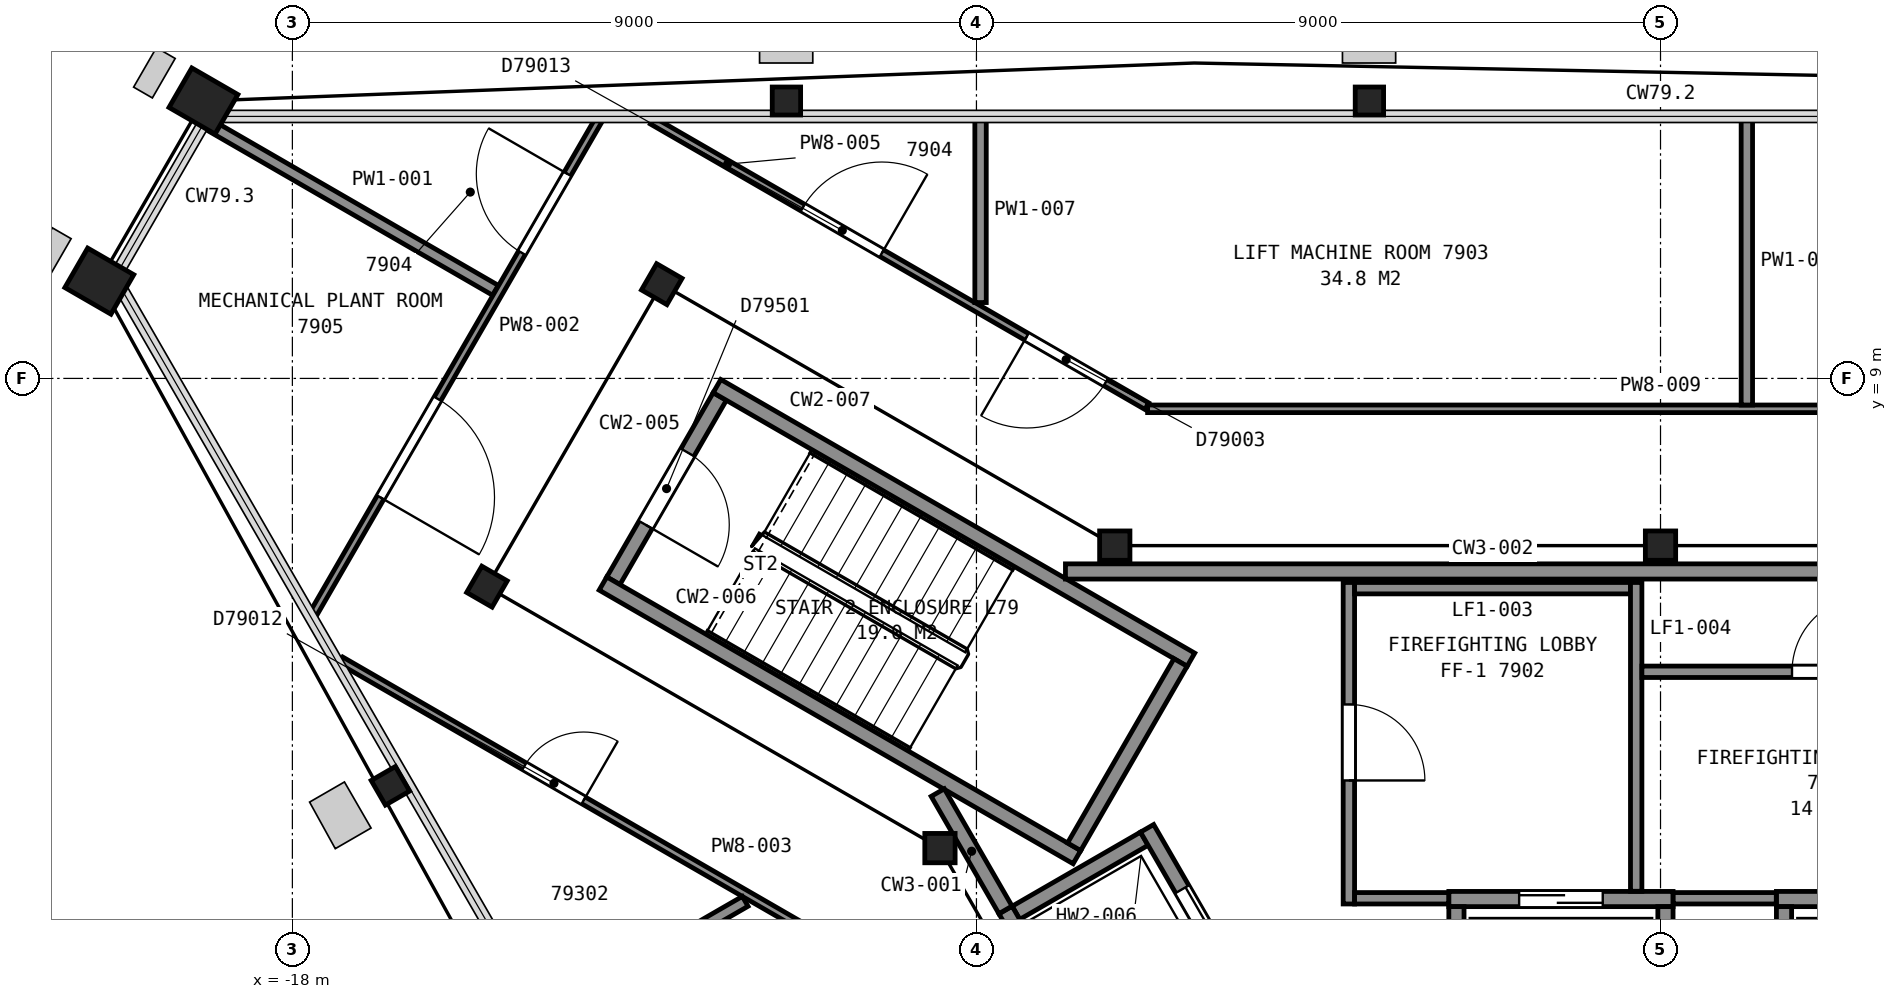
"""IFC4 building model, lengths in metres.
Left out: names, types, materials, properties, quantities, classifications, styles, units other than length and angle.
Written with IfcOpenShell. Run it as: python <this file> out.ifc"""

import sys

from ifc_helpers import new_model, si_unit, direction, frame, frame_2d, origin, origin_2d, place, context, subcontext, project, spatial, rectangle, hollow_rectangle, i_section, extrude, element, fill, save


model = new_model("IFC4")
c1 = context("Model", 3, precision=1e-05, world=origin(), true_north=direction((0.0, 1.0)))
c2 = subcontext(c1, "Body", "Model", "MODEL_VIEW")
j1 = project(units=[si_unit("LENGTHUNIT", "METRE"), si_unit("PLANEANGLEUNIT", "RADIAN")], contexts=[c1])
p1 = place(None, origin())
s1 = spatial("IfcSite", under=j1, at=p1, CompositionType="ELEMENT")
p2 = place(p1, origin())
s2 = spatial("IfcBuilding", under=s1, at=p2, CompositionType="ELEMENT")
p3 = place(p2, frame((0.0, 0.0, 312.6)))
s3 = spatial("IfcBuildingStorey", under=s2, at=p3, CompositionType="ELEMENT", Elevation=312.6)
for number, where, z_axis, x_axis in (
    (1, (-3.83, 12.65, 0.0), (0.0, 0.0, 1.0), (1.0, 0.0, 0.0)),
    (2, (-11.5, 12.65, 0.0), (0.0, 0.0, 1.0), (1.0, 0.0, 0.0)),
):
    element("IfcColumn", number, at=place(p3, frame(where, z_axis=z_axis, x_axis=x_axis)), inside=s3, PredefinedType="COLUMN", context=c2, shape_type="SweptSolid", body=[
        extrude(i_section(OverallWidth=0.373, OverallDepth=0.368, WebThickness=0.015, FlangeThickness=0.024, FilletRadius=0.015, at=origin_2d()), origin(), (0.0, 0.0, 1.0), 4.2),
    ])
for number, where, z_axis, x_axis in (
    (3, (-19.17, 12.65, 0.0), (0.0, 0.0, 1.0), (0.5, 0.866, 0.0)),
    (4, (-20.54, 10.28, 0.0), (0.0, 0.0, 1.0), (0.5, 0.866, 0.0)),
):
    element("IfcColumn", number, at=place(p3, frame(where, z_axis=z_axis, x_axis=x_axis)), inside=s3, PredefinedType="COLUMN", context=c2, shape_type="SweptSolid", body=[
        extrude(hollow_rectangle(XDim=0.6, YDim=0.7, WallThickness=0.04, at=origin_2d()), origin(), (0.0, 0.0, 1.0), 4.2),
    ])
p4 = place(p3, frame((-16.71, 3.64, 0.0), z_axis=(0.0, 0.0, 1.0), x_axis=(-0.5, 0.866025403784, 0.0)))
e5 = element("IfcColumn", 5, at=p4, inside=s3, PredefinedType="COLUMN", context=c2, shape_type="SweptSolid", body=[
    extrude(i_section(OverallWidth=0.373, OverallDepth=0.368, WebThickness=0.015, FlangeThickness=0.024, FilletRadius=0.015, at=origin_2d()), origin(), (0.0, 0.0, 1.0), 4.2),
])
for number, where, z_axis, x_axis in (
    (6, (0.0, 6.8, 0.0), (0.0, 0.0, 1.0), (1.0, 0.0, 0.0)),
    (7, (-7.18, 6.8, 0.0), (0.0, 0.0, 1.0), (1.0, 0.0, 0.0)),
    (8, (-13.14, 10.24, 0.0), (0.0, 0.0, 1.0), (0.5, 0.866, 0.0)),
    (9, (-15.44, 6.26, 0.0), (0.0, 0.0, 1.0), (0.5, 0.866, 0.0)),
    (10, (-9.48, 2.82, 0.0), (0.0, 0.0, 1.0), (1.0, 0.0, 0.0)),
):
    element("IfcColumn", number, at=place(p3, frame(where, z_axis=z_axis, x_axis=x_axis)), inside=s3, PredefinedType="COLUMN", context=c2, shape_type="SweptSolid", body=[
        extrude(i_section(OverallWidth=0.399, OverallDepth=0.386, WebThickness=0.021, FlangeThickness=0.033, FilletRadius=0.015, at=origin_2d()), origin(), (0.0, 0.0, 1.0), 4.2),
    ])
p5 = place(p3, frame((-12.377, 8.762, 0.0), z_axis=(0.0, 0.0, 1.0), x_axis=(-0.500049511043, -0.865996816683, 0.0)))
e11 = element("IfcWall", 11, at=p5, inside=s3, PredefinedType="PARTITIONING", context=c2, shape_type="SweptSolid", body=[
    extrude(rectangle(XDim=2.8, YDim=0.2, at=frame_2d((1.4, 0.0))), origin(), (0.0, 0.0, 1.0), 3.95),
])
p6 = place(p5, frame((0.85, 0.0, 0.0)))
e12 = element("IfcOpeningElement", 12, at=p6, cuts=e11, PredefinedType="OPENING", context=c2, shape_type="SweptSolid", body=[
    extrude(rectangle(XDim=1.1, YDim=2.1, at=frame_2d((0.55, 1.05))), frame((0.0, 0.11, 0.0), z_axis=(0.0, -1.0, 0.0), x_axis=(1.0, 0.0, 0.0)), (0.0, 0.0, 1.0), 0.22),
])
for number, where, z_axis, x_axis in (
    (13, (-7.678, 2.701, 0.0), (0.0, 0.0, 1.0), (-0.866, 0.5, 0.0)),
    (14, (-6.178, 5.299, 0.0), (0.0, 0.0, 1.0), (-0.866, 0.5, 0.0)),
):
    element("IfcWall", number, at=place(p3, frame(where, z_axis=z_axis, x_axis=x_axis)), inside=s3, PredefinedType="PARTITIONING", context=c2, shape_type="SweptSolid", body=[
        extrude(rectangle(XDim=7.2, YDim=0.2, at=frame_2d((3.6, 0.0))), origin(), (0.0, 0.0, 1.0), 3.95),
    ])
p7 = place(p3, frame((-6.315, 5.262, 0.0), z_axis=(0.0, 0.0, 1.0), x_axis=(-0.500049511043, -0.865996816683, 0.0)))
e15 = element("IfcWall", 15, at=p7, inside=s3, PredefinedType="PARTITIONING", context=c2, shape_type="SweptSolid", body=[
    extrude(rectangle(XDim=2.8, YDim=0.2, at=frame_2d((1.4, 0.0))), origin(), (0.0, 0.0, 1.0), 3.95),
])
p8 = place(p3, frame((-2.785, 2.15, 0.0), z_axis=(0.0, 0.0, 1.0), x_axis=(1.0, 0.0, 0.0)))
e16 = element("IfcWall", 16, at=p8, inside=s3, PredefinedType="PARTITIONING", context=c2, shape_type="SweptSolid", body=[
    extrude(rectangle(XDim=2.95, YDim=0.2, at=frame_2d((1.475, 0.0))), origin(), (0.0, 0.0, 1.0), 4.2),
])
p9 = place(p8, frame((0.925, 0.0, 0.0)))
e17 = element("IfcOpeningElement", 17, at=p9, cuts=e16, PredefinedType="OPENING", context=c2, shape_type="SweptSolid", body=[
    extrude(rectangle(XDim=1.1, YDim=2.1, at=frame_2d((0.55, 1.05))), frame((0.0, 0.11, 0.0), z_axis=(0.0, -1.0, 0.0), x_axis=(1.0, 0.0, 0.0)), (0.0, 0.0, 1.0), 0.22),
])
p10 = place(p3, frame((1.525, 2.15, 0.0), z_axis=(0.0, 0.0, 1.0), x_axis=(1.0, 0.0, 0.0)))
e18 = element("IfcWall", 18, at=p10, inside=s3, PredefinedType="PARTITIONING", context=c2, shape_type="SweptSolid", body=[
    extrude(rectangle(XDim=2.95, YDim=0.2, at=frame_2d((1.475, 0.0))), origin(), (0.0, 0.0, 1.0), 4.2),
])
p11 = place(p10, frame((0.925, 0.0, 0.0)))
e19 = element("IfcOpeningElement", 19, at=p11, cuts=e18, PredefinedType="OPENING", context=c2, shape_type="SweptSolid", body=[
    extrude(rectangle(XDim=1.1, YDim=2.1, at=frame_2d((0.55, 1.05))), frame((0.0, 0.11, 0.0), z_axis=(0.0, -1.0, 0.0), x_axis=(1.0, 0.0, 0.0)), (0.0, 0.0, 1.0), 0.22),
])
for number, where, z_axis, x_axis in (
    (20, (-8.48, 1.969, 0.0), (0.0, 0.0, 1.0), (0.866, 0.5, 0.0)),
    (21, (1.625, 0.1, 0.0), (0.0, 0.0, 1.0), (0.0, 1.0, 0.0)),
    (22, (0.065, 0.1, 0.0), (0.0, 0.0, 1.0), (0.0, 1.0, 0.0)),
    (23, (-2.685, 0.1, 0.0), (0.0, 0.0, 1.0), (0.0, 1.0, 0.0)),
):
    element("IfcWall", number, at=place(p3, frame(where, z_axis=z_axis, x_axis=x_axis)), inside=s3, PredefinedType="PARTITIONING", context=c2, shape_type="SweptSolid", body=[
        extrude(rectangle(XDim=1.95, YDim=0.2, at=frame_2d((0.975, 0.0))), origin(), (0.0, 0.0, 1.0), 4.2),
    ])
p12 = place(p3, frame((-5.28, 0.525, 0.0), z_axis=(0.0, 0.0, 1.0), x_axis=(-0.500037662692, 0.866003658127, 0.0)))
e24 = element("IfcWall", 24, at=p12, inside=s3, PredefinedType="PARTITIONING", context=c2, shape_type="SweptSolid", body=[
    extrude(rectangle(XDim=2.95, YDim=0.2, at=frame_2d((1.475, 0.0))), origin(), (0.0, 0.0, 1.0), 4.2),
])
p13 = place(p12, frame((0.925, 0.0, 0.0)))
e25 = element("IfcOpeningElement", 25, at=p13, cuts=e24, PredefinedType="OPENING", context=c2, shape_type="SweptSolid", body=[
    extrude(rectangle(XDim=1.1, YDim=2.1, at=frame_2d((0.55, 1.05))), frame((0.0, 0.11, 0.0), z_axis=(0.0, -1.0, 0.0), x_axis=(1.0, 0.0, 0.0)), (0.0, 0.0, 1.0), 0.22),
])
p14 = place(p3, frame((-7.142, -0.55, 0.0), z_axis=(0.0, 0.0, 1.0), x_axis=(-0.49997559174, 0.866039495442, 0.0)))
e26 = element("IfcWall", 26, at=p14, inside=s3, PredefinedType="PARTITIONING", context=c2, shape_type="SweptSolid", body=[
    extrude(rectangle(XDim=2.95, YDim=0.2, at=frame_2d((1.475, 0.0))), origin(), (0.0, 0.0, 1.0), 4.2),
])
p15 = place(p3, frame((-9.509, 3.551, 0.0), z_axis=(0.0, 0.0, 1.0), x_axis=(0.499999136801, -0.866025902152, 0.0)))
e27 = element("IfcWall", 27, at=p15, inside=s3, PredefinedType="PARTITIONING", context=c2, shape_type="SweptSolid", body=[
    extrude(rectangle(XDim=1.782, YDim=0.2, at=frame_2d((0.891, 0.0))), origin(), (0.0, 0.0, 1.0), 3.95),
])
p16 = place(p3, frame((7.829, 6.46, 0.0), z_axis=(0.0, 0.0, 1.0), x_axis=(-1.0, 0.0, 0.0)))
e28 = element("IfcWall", 28, at=p16, inside=s3, PredefinedType="PARTITIONING", context=c2, shape_type="SweptSolid", body=[
    extrude(rectangle(XDim=15.658, YDim=0.2, at=frame_2d((7.829, 0.0))), origin(), (0.0, 0.0, 1.0), 3.95),
])
p17 = place(p16, frame((2.618, 0.0, 0.0)))
e29 = element("IfcOpeningElement", 29, at=p17, cuts=e28, PredefinedType="OPENING", context=c2, shape_type="SweptSolid", body=[
    extrude(rectangle(XDim=1.8, YDim=2.1, at=frame_2d((0.9, 1.05))), frame((0.0, 0.11, 0.0), z_axis=(0.0, -1.0, 0.0), x_axis=(1.0, 0.0, 0.0)), (0.0, 0.0, 1.0), 0.22),
])
p18 = place(p3, frame((-4.1, 2.085, 0.0), z_axis=(0.0, 0.0, 1.0), x_axis=(0.0, 1.0, 0.0)))
e30 = element("IfcWall", 30, at=p18, inside=s3, PredefinedType="PARTITIONING", context=c2, shape_type="SweptSolid", body=[
    extrude(rectangle(XDim=4.23, YDim=0.15, at=frame_2d((2.115, 0.0))), origin(), (0.0, 0.0, 1.0), 3.95),
])
p19 = place(p18, frame((1.625, 0.0, 0.0)))
e31 = element("IfcOpeningElement", 31, at=p19, cuts=e30, PredefinedType="OPENING", context=c2, shape_type="SweptSolid", body=[
    extrude(rectangle(XDim=1.0, YDim=2.1, at=frame_2d((0.5, 1.05))), frame((0.0, 0.085, 0.0), z_axis=(0.0, -1.0, 0.0), x_axis=(1.0, 0.0, 0.0)), (0.0, 0.0, 1.0), 0.17),
])
p20 = place(p3, frame((-4.025, 2.16, 0.0), z_axis=(0.0, 0.0, 1.0), x_axis=(1.0, 0.0, 0.0)))
e32 = element("IfcWall", 32, at=p20, inside=s3, PredefinedType="PARTITIONING", context=c2, shape_type="SweptSolid", body=[
    extrude(rectangle(XDim=1.238, YDim=0.15, at=frame_2d((0.619, 0.0))), origin(), (0.0, 0.0, 1.0), 3.95),
])
p21 = place(p3, frame((-4.025, 6.24, 0.0), z_axis=(0.0, 0.0, 1.0), x_axis=(1.0, 0.0, 0.0)))
e33 = element("IfcWall", 33, at=p21, inside=s3, PredefinedType="PARTITIONING", context=c2, shape_type="SweptSolid", body=[
    extrude(rectangle(XDim=3.63, YDim=0.15, at=frame_2d((1.815, 0.0))), origin(), (0.0, 0.0, 1.0), 3.95),
])
p22 = place(p3, frame((-0.32, 2.252, 0.0), z_axis=(0.0, 0.0, 1.0), x_axis=(0.0, 1.0, 0.0)))
e34 = element("IfcWall", 34, at=p22, inside=s3, PredefinedType="PARTITIONING", context=c2, shape_type="SweptSolid", body=[
    extrude(rectangle(XDim=4.063, YDim=0.15, at=frame_2d((2.031, 0.0))), origin(), (0.0, 0.0, 1.0), 3.95),
])
p23 = place(p3, frame((-0.245, 5.14, 0.0), z_axis=(0.0, 0.0, 1.0), x_axis=(1.0, 0.0, 0.0)))
e35 = element("IfcWall", 35, at=p23, inside=s3, PredefinedType="PARTITIONING", context=c2, shape_type="SweptSolid", body=[
    extrude(rectangle(XDim=5.11, YDim=0.15, at=frame_2d((2.555, 0.0))), origin(), (0.0, 0.0, 1.0), 3.95),
])
p24 = place(p23, frame((1.975, 0.0, 0.0)))
e36 = element("IfcOpeningElement", 36, at=p24, cuts=e35, PredefinedType="OPENING", context=c2, shape_type="SweptSolid", body=[
    extrude(rectangle(XDim=1.0, YDim=2.1, at=frame_2d((0.5, 1.05))), frame((0.0, 0.085, 0.0), z_axis=(0.0, -1.0, 0.0), x_axis=(1.0, 0.0, 0.0)), (0.0, 0.0, 1.0), 0.17),
])
p25 = place(p3, frame((0.167, 2.16, 0.0), z_axis=(0.0, 0.0, 1.0), x_axis=(1.0, 0.0, 0.0)))
e37 = element("IfcWall", 37, at=p25, inside=s3, PredefinedType="PARTITIONING", context=c2, shape_type="SweptSolid", body=[
    extrude(rectangle(XDim=1.356, YDim=0.15, at=frame_2d((0.678, 0.0))), origin(), (0.0, 0.0, 1.0), 3.95),
])
p26 = place(p3, frame((-19.145, 12.365, 0.0), z_axis=(0.0, 0.0, 1.0), x_axis=(0.865798950571, -0.500392023508, 0.0)))
e38 = element("IfcWall", 38, at=p26, inside=s3, PredefinedType="PARTITIONING", context=c2, shape_type="SweptSolid", body=[
    extrude(rectangle(XDim=4.408, YDim=0.15, at=frame_2d((2.204, 0.0))), origin(), (0.0, 0.0, 1.0), 3.297),
])
p27 = place(p3, frame((-17.73, 5.894, 0.0), z_axis=(0.0, 0.0, 1.0), x_axis=(0.500350572687, 0.865822905918, 0.0)))
e39 = element("IfcWall", 39, at=p27, inside=s3, PredefinedType="PARTITIONING", context=c2, shape_type="SweptSolid", body=[
    extrude(rectangle(XDim=7.524, YDim=0.1, at=frame_2d((3.762, 0.0))), origin(), (0.0, 0.0, 1.0), 3.297),
])
p28 = place(p27, frame((5.496, 0.0, 0.0)))
e40 = element("IfcOpeningElement", 40, at=p28, cuts=e39, PredefinedType="OPENING", context=c2, shape_type="SweptSolid", body=[
    extrude(rectangle(XDim=1.2, YDim=2.1, at=frame_2d((0.6, 1.05))), frame((0.0, 0.06, 0.0), z_axis=(0.0, -1.0, 0.0), x_axis=(1.0, 0.0, 0.0)), (0.0, 0.0, 1.0), 0.12),
])
p29 = place(p27, frame((1.779, 0.0, 0.0)))
e41 = element("IfcOpeningElement", 41, at=p29, cuts=e39, PredefinedType="OPENING", context=c2, shape_type="SweptSolid", body=[
    extrude(rectangle(XDim=1.5, YDim=2.1, at=frame_2d((0.75, 1.05))), frame((0.0, 0.06, 0.0), z_axis=(0.0, -1.0, 0.0), x_axis=(1.0, 0.0, 0.0)), (0.0, 0.0, 1.0), 0.12),
])
p30 = place(p3, frame((-10.859, 1.537, 0.0), z_axis=(0.0, 0.0, 1.0), x_axis=(-0.866105995393, 0.499860385252, 0.0)))
e42 = element("IfcWall", 42, at=p30, inside=s3, PredefinedType="PARTITIONING", context=c2, shape_type="SweptSolid", body=[
    extrude(rectangle(XDim=7.508, YDim=0.1, at=frame_2d((3.754, 0.0))), origin(), (0.0, 0.0, 1.0), 3.297),
])
p31 = place(p30, frame((3.822, 0.0, 0.0)))
e43 = element("IfcOpeningElement", 43, at=p31, cuts=e42, PredefinedType="OPENING", context=c2, shape_type="SweptSolid", body=[
    extrude(rectangle(XDim=0.9, YDim=2.1, at=frame_2d((0.45, 1.05))), frame((0.0, 0.06, 0.0), z_axis=(0.0, -1.0, 0.0), x_axis=(1.0, 0.0, 0.0)), (0.0, 0.0, 1.0), 0.12),
])
p32 = place(p3, frame((-14.696, 0.588, 0.0), z_axis=(0.0, 0.0, 1.0), x_axis=(0.866116586143, 0.499842034255, 0.0)))
e44 = element("IfcWall", 44, at=p32, inside=s3, PredefinedType="PARTITIONING", context=c2, shape_type="SweptSolid", body=[
    extrude(rectangle(XDim=3.063, YDim=0.15, at=frame_2d((1.532, 0.0))), origin(), (0.0, 0.0, 1.0), 3.297),
])
p33 = place(p3, frame((-13.265, 12.391, 0.0), z_axis=(0.0, 0.0, 1.0), x_axis=(0.866073029218, -0.499917501255, 0.0)))
e45 = element("IfcWall", 45, at=p33, inside=s3, PredefinedType="PARTITIONING", context=c2, shape_type="SweptSolid", body=[
    extrude(rectangle(XDim=7.512, YDim=0.1, at=frame_2d((3.756, 0.0))), origin(), (0.0, 0.0, 1.0), 3.297),
])
p34 = place(p33, frame((5.687, 0.0, 0.0)))
e46 = element("IfcOpeningElement", 46, at=p34, cuts=e45, PredefinedType="OPENING", context=c2, shape_type="SweptSolid", body=[
    extrude(rectangle(XDim=1.2, YDim=2.1, at=frame_2d((0.6, 1.05))), frame((0.0, 0.06, 0.0), z_axis=(0.0, -1.0, 0.0), x_axis=(1.0, 0.0, 0.0)), (0.0, 0.0, 1.0), 0.12),
])
p35 = place(p33, frame((2.287, 0.0, 0.0)))
e47 = element("IfcOpeningElement", 47, at=p35, cuts=e45, PredefinedType="OPENING", context=c2, shape_type="SweptSolid", body=[
    extrude(rectangle(XDim=1.2, YDim=2.1, at=frame_2d((0.6, 1.05))), frame((0.0, 0.06, 0.0), z_axis=(0.0, -1.0, 0.0), x_axis=(1.0, 0.0, 0.0)), (0.0, 0.0, 1.0), 0.12),
])
p36 = place(p3, frame((-8.946, 9.998, 0.0), z_axis=(0.0, 0.0, 1.0), x_axis=(0.0, 1.0, 0.0)))
e48 = element("IfcWall", 48, at=p36, inside=s3, PredefinedType="PARTITIONING", context=c2, shape_type="SweptSolid", body=[
    extrude(rectangle(XDim=2.435, YDim=0.15, at=frame_2d((1.218, 0.0))), origin(), (0.0, 0.0, 1.0), 3.297),
])
p37 = place(p3, frame((-6.748, 8.6, 0.0), z_axis=(0.0, 0.0, 1.0), x_axis=(1.0, 0.0, 0.0)))
e49 = element("IfcWall", 49, at=p37, inside=s3, PredefinedType="PARTITIONING", context=c2, shape_type="SweptSolid", body=[
    extrude(rectangle(XDim=13.496, YDim=0.1, at=frame_2d((6.748, 0.0))), origin(), (0.0, 0.0, 1.0), 3.297),
])
p38 = place(p3, frame((1.136, 8.65, 0.0), z_axis=(0.0, 0.0, 1.0), x_axis=(0.0, 1.0, 0.0)))
e50 = element("IfcWall", 50, at=p38, inside=s3, PredefinedType="PARTITIONING", context=c2, shape_type="SweptSolid", body=[
    extrude(rectangle(XDim=3.783, YDim=0.15, at=frame_2d((1.892, 0.0))), origin(), (0.0, 0.0, 1.0), 3.297),
])
p39 = place(p6, origin())
e51 = element("IfcDoor", 51, at=p39, inside=s3, OperationType="SINGLE_SWING_RIGHT", PredefinedType="DOOR", context=c2, shape_type="SweptSolid", body=[
    extrude(rectangle(XDim=1.1, YDim=2.1, at=frame_2d((0.55, 1.05))), frame((0.0, 0.025, 0.0), z_axis=(0.0, -1.0, 0.0), x_axis=(1.0, 0.0, 0.0)), (0.0, 0.0, 1.0), 0.05),
])
fill(e12, e51)
p40 = place(p9, origin())
e52 = element("IfcDoor", 52, at=p40, inside=s3, OperationType="SLIDING_TO_LEFT", PredefinedType="DOOR", context=c2, shape_type="SweptSolid", body=[
    extrude(rectangle(XDim=1.1, YDim=2.1, at=frame_2d((0.55, 1.05))), frame((0.0, 0.025, 0.0), z_axis=(0.0, -1.0, 0.0), x_axis=(1.0, 0.0, 0.0)), (0.0, 0.0, 1.0), 0.05),
])
fill(e17, e52)
p41 = place(p13, origin())
e53 = element("IfcDoor", 53, at=p41, inside=s3, OperationType="SLIDING_TO_LEFT", PredefinedType="DOOR", context=c2, shape_type="SweptSolid", body=[
    extrude(rectangle(XDim=1.1, YDim=2.1, at=frame_2d((0.55, 1.05))), frame((0.0, 0.025, 0.0), z_axis=(0.0, -1.0, 0.0), x_axis=(1.0, 0.0, 0.0)), (0.0, 0.0, 1.0), 0.05),
])
fill(e25, e53)
p42 = place(p19, origin())
e54 = element("IfcDoor", 54, at=p42, inside=s3, OperationType="SINGLE_SWING_LEFT", PredefinedType="DOOR", context=c2, shape_type="SweptSolid", body=[
    extrude(rectangle(XDim=1.0, YDim=2.1, at=frame_2d((0.5, 1.05))), frame((0.0, 0.025, 0.0), z_axis=(0.0, -1.0, 0.0), x_axis=(1.0, 0.0, 0.0)), (0.0, 0.0, 1.0), 0.05),
])
fill(e31, e54)
p43 = place(p24, origin())
e55 = element("IfcDoor", 55, at=p43, inside=s3, OperationType="SINGLE_SWING_RIGHT", PredefinedType="DOOR", context=c2, shape_type="SweptSolid", body=[
    extrude(rectangle(XDim=1.0, YDim=2.1, at=frame_2d((0.5, 1.05))), frame((0.0, 0.025, 0.0), z_axis=(0.0, -1.0, 0.0), x_axis=(1.0, 0.0, 0.0)), (0.0, 0.0, 1.0), 0.05),
])
fill(e36, e55)
p44 = place(p28, origin())
e56 = element("IfcDoor", 56, at=p44, inside=s3, OperationType="SINGLE_SWING_RIGHT", PredefinedType="DOOR", context=c2, shape_type="SweptSolid", body=[
    extrude(rectangle(XDim=1.2, YDim=2.1, at=frame_2d((0.6, 1.05))), frame((0.0, 0.025, 0.0), z_axis=(0.0, -1.0, 0.0), x_axis=(1.0, 0.0, 0.0)), (0.0, 0.0, 1.0), 0.05),
])
fill(e40, e56)
p45 = place(p29, origin())
e57 = element("IfcDoor", 57, at=p45, inside=s3, OperationType="DOUBLE_DOOR_SINGLE_SWING", PredefinedType="DOOR", context=c2, shape_type="SweptSolid", body=[
    extrude(rectangle(XDim=1.5, YDim=2.1, at=frame_2d((0.75, 1.05))), frame((0.0, 0.025, 0.0), z_axis=(0.0, -1.0, 0.0), x_axis=(1.0, 0.0, 0.0)), (0.0, 0.0, 1.0), 0.05),
])
fill(e41, e57)
p46 = place(p31, origin())
e58 = element("IfcDoor", 58, at=p46, inside=s3, OperationType="SINGLE_SWING_LEFT", PredefinedType="DOOR", context=c2, shape_type="SweptSolid", body=[
    extrude(rectangle(XDim=0.9, YDim=2.1, at=frame_2d((0.45, 1.05))), frame((0.0, 0.025, 0.0), z_axis=(0.0, -1.0, 0.0), x_axis=(1.0, 0.0, 0.0)), (0.0, 0.0, 1.0), 0.05),
])
fill(e43, e58)
p47 = place(p34, origin())
e59 = element("IfcDoor", 59, at=p47, inside=s3, OperationType="SINGLE_SWING_LEFT", PredefinedType="DOOR", context=c2, shape_type="SweptSolid", body=[
    extrude(rectangle(XDim=1.2, YDim=2.1, at=frame_2d((0.6, 1.05))), frame((0.0, 0.025, 0.0), z_axis=(0.0, -1.0, 0.0), x_axis=(1.0, 0.0, 0.0)), (0.0, 0.0, 1.0), 0.05),
])
fill(e46, e59)
p48 = place(p35, origin())
e60 = element("IfcDoor", 60, at=p48, inside=s3, OperationType="SINGLE_SWING_RIGHT", PredefinedType="DOOR", context=c2, shape_type="SweptSolid", body=[
    extrude(rectangle(XDim=1.2, YDim=2.1, at=frame_2d((0.6, 1.05))), frame((0.0, 0.025, 0.0), z_axis=(0.0, -1.0, 0.0), x_axis=(1.0, 0.0, 0.0)), (0.0, 0.0, 1.0), 0.05),
])
fill(e47, e60)
save(model, sys.argv[1])
